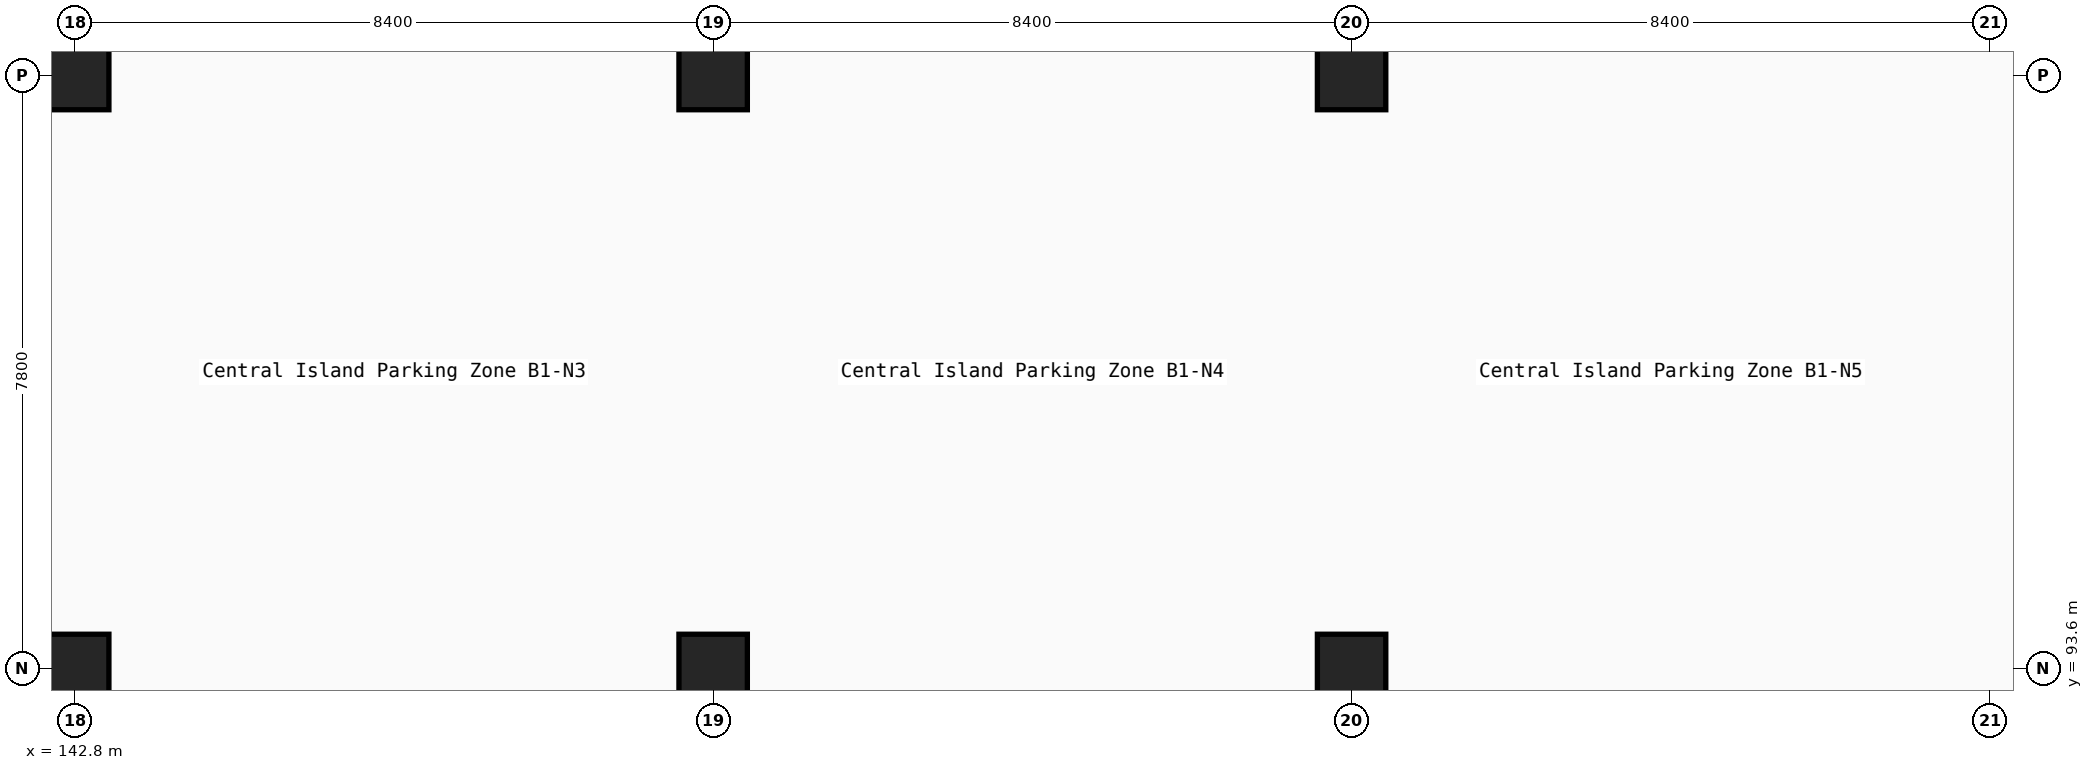
"""IFC4 building model, lengths in metres.
Left out: names, types, materials, properties, quantities, classifications, styles, units other than length and angle.
Written with IfcOpenShell. Run it as: python <this file> out.ifc"""

import sys

from ifc_helpers import new_model, si_unit, direction, frame, origin, origin_2d, place, context, subcontext, project, spatial, rectangle, extrude, element, save


model = new_model("IFC4")
c1 = context("Model", 3, precision=1e-05, world=origin(), true_north=direction((0.0, 1.0)))
c2 = subcontext(c1, "Body", "Model", "MODEL_VIEW")
j1 = project(units=[si_unit("LENGTHUNIT", "METRE"), si_unit("PLANEANGLEUNIT", "RADIAN")], contexts=[c1])
p1 = place(None, origin())
s1 = spatial("IfcSite", under=j1, at=p1, CompositionType="ELEMENT")
p2 = place(p1, origin())
s2 = spatial("IfcBuilding", under=s1, at=p2, CompositionType="ELEMENT")
p3 = place(p2, frame((0.0, 0.0, -5.1)))
s3 = spatial("IfcBuildingStorey", under=s2, at=p3, CompositionType="ELEMENT", Elevation=-5.1)
for number, where, z_axis, x_axis in (
    (1, (142.8, 93.6, -0.22), (0.0, 0.0, 1.0), (1.0, 0.0, 0.0)),
    (2, (142.8, 101.4, -0.22), (0.0, 0.0, 1.0), (1.0, 0.0, 0.0)),
    (3, (151.2, 93.6, -0.22), (0.0, 0.0, 1.0), (1.0, 0.0, 0.0)),
    (4, (151.2, 101.4, -0.22), (0.0, 0.0, 1.0), (1.0, 0.0, 0.0)),
    (5, (159.6, 93.6, -0.22), (0.0, 0.0, 1.0), (1.0, 0.0, 0.0)),
    (6, (159.6, 101.4, -0.22), (0.0, 0.0, 1.0), (1.0, 0.0, 0.0)),
):
    element("IfcColumn", number, at=place(p3, frame(where, z_axis=z_axis, x_axis=x_axis)), inside=s3, PredefinedType="COLUMN", context=c2, shape_type="SweptSolid", body=[
        extrude(rectangle(XDim=0.9, YDim=0.9, at=origin_2d()), origin(), (0.0, 0.0, 1.0), 5.32),
    ])
save(model, sys.argv[1])
